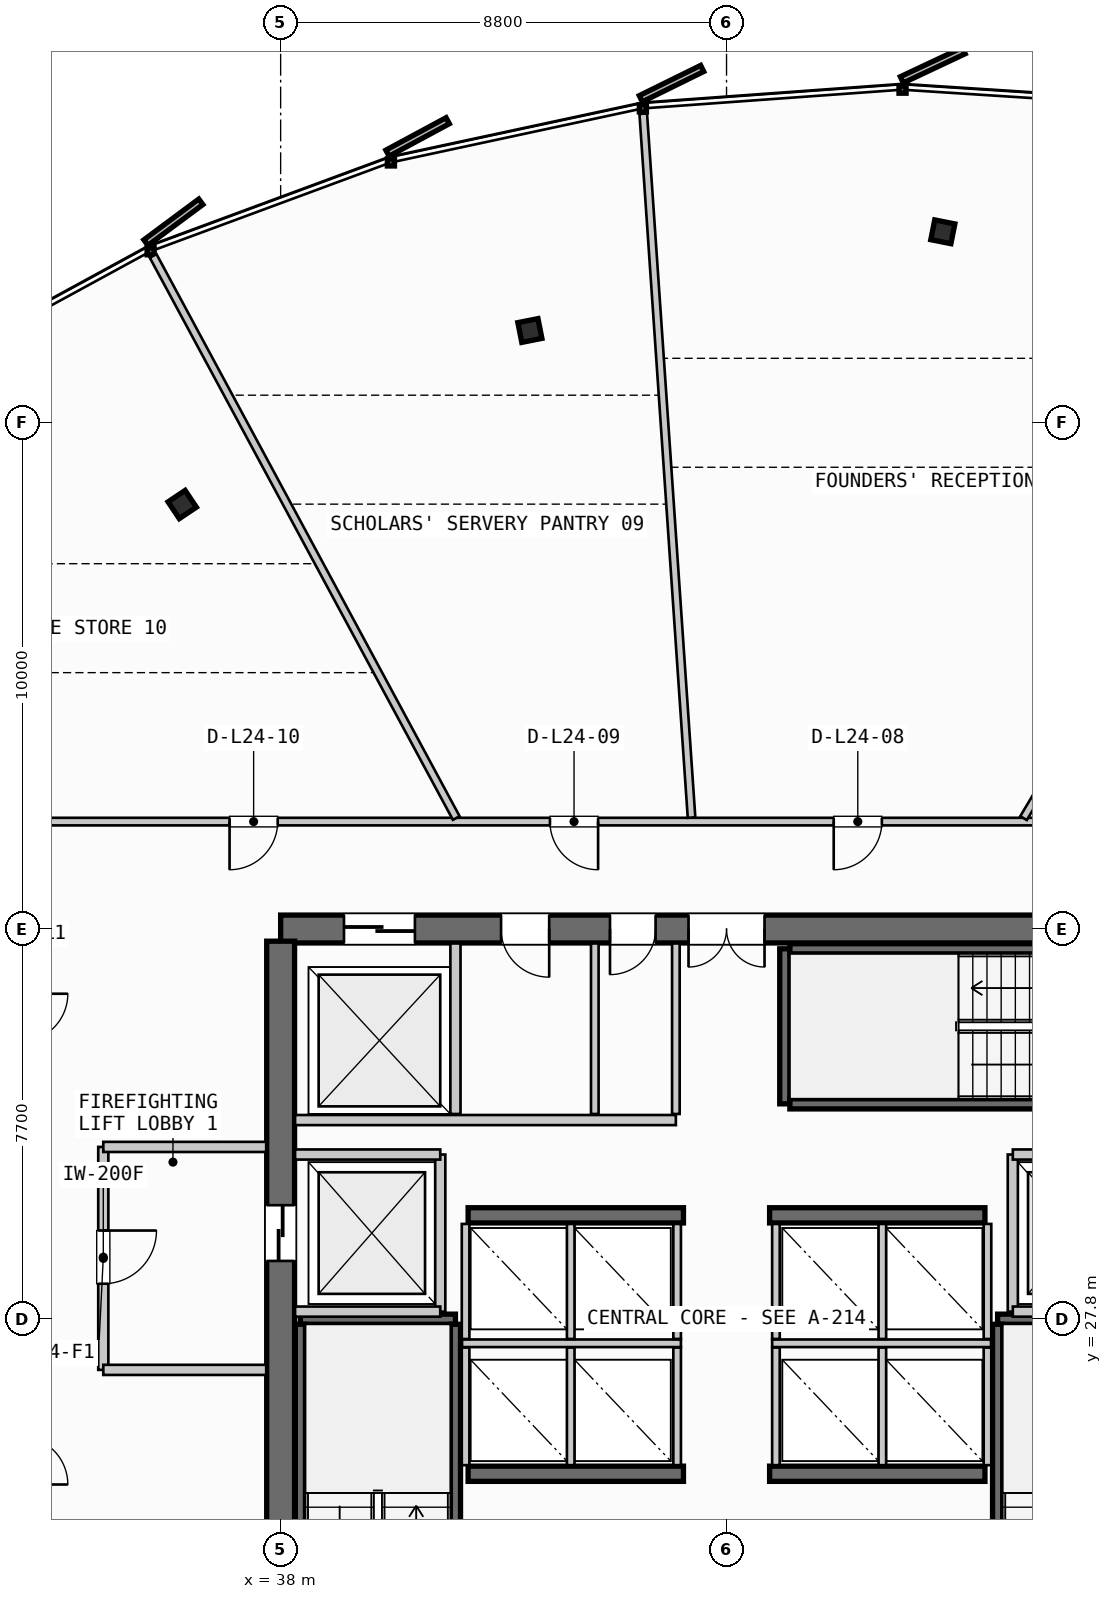
"""IFC4 building model, lengths in metres.
Left out: names, types, materials, properties, quantities, classifications, styles, units other than length and angle.
Written with IfcOpenShell. Run it as: python <this file> out.ifc"""

import sys

from ifc_helpers import new_model, si_unit, direction, frame, frame_2d, origin, origin_2d, place, context, subcontext, project, spatial, rectangle, i_section, extrude, source, transform, mapped, element, fill, save


model = new_model("IFC4")
c1 = context("Model", 3, precision=1e-05, world=origin(), true_north=direction((0.0, 1.0)))
c2 = subcontext(c1, "Body", "Model", "MODEL_VIEW")
j1 = project(units=[si_unit("LENGTHUNIT", "METRE"), si_unit("PLANEANGLEUNIT", "RADIAN")], contexts=[c1])
p1 = place(None, origin())
s1 = spatial("IfcSite", under=j1, at=p1, CompositionType="ELEMENT")
p2 = place(p1, origin())
s2 = spatial("IfcBuilding", under=s1, at=p2, CompositionType="ELEMENT")
p3 = place(p2, frame((0.0, 0.0, 100.0)))
s3 = spatial("IfcBuildingStorey", under=s2, at=p3, CompositionType="ELEMENT", Elevation=100.0)
p4 = place(p3, frame((55.6, 35.5, 0.0), z_axis=(0.0, 0.0, 1.0), x_axis=(-1.0, 0.0, 0.0)))
e1 = element("IfcWall", 1, at=p4, inside=s3, PredefinedType="SHEAR", context=c2, shape_type="SweptSolid", body=[
    extrude(rectangle(XDim=17.6, YDim=0.55, at=frame_2d((8.8, 0.0))), origin(), (0.0, 0.0, 1.0), 3.35),
])
p5 = place(p4, frame((8.05, 0.0, 0.0)))
e2 = element("IfcOpeningElement", 2, at=p5, cuts=e1, PredefinedType="OPENING", context=c2, shape_type="SweptSolid", body=[
    extrude(rectangle(XDim=1.5, YDim=2.2, at=frame_2d((0.75, 1.1))), frame((0.0, 0.285, 0.0), z_axis=(0.0, -1.0, 0.0), x_axis=(1.0, 0.0, 0.0)), (0.0, 0.0, 1.0), 0.57),
])
p6 = place(p4, frame((14.95, 0.0, 0.0)))
e3 = element("IfcOpeningElement", 3, at=p6, cuts=e1, PredefinedType="OPENING", context=c2, shape_type="SweptSolid", body=[
    extrude(rectangle(XDim=1.4, YDim=2.3, at=frame_2d((0.7, 1.15))), frame((0.0, 0.285, 0.0), z_axis=(0.0, -1.0, 0.0), x_axis=(1.0, 0.0, 0.0)), (0.0, 0.0, 1.0), 0.57),
])
p7 = place(p4, frame((12.3, 0.0, 0.0)))
e4 = element("IfcOpeningElement", 4, at=p7, cuts=e1, PredefinedType="OPENING", context=c2, shape_type="SweptSolid", body=[
    extrude(rectangle(XDim=0.95, YDim=2.15, at=frame_2d((0.475, 1.075))), frame((0.0, 0.285, 0.0), z_axis=(0.0, -1.0, 0.0), x_axis=(1.0, 0.0, 0.0)), (0.0, 0.0, 1.0), 0.57),
])
p8 = place(p4, frame((10.2, 0.0, 0.0)))
e5 = element("IfcOpeningElement", 5, at=p8, cuts=e1, PredefinedType="OPENING", context=c2, shape_type="SweptSolid", body=[
    extrude(rectangle(XDim=0.9, YDim=2.15, at=frame_2d((0.45, 1.075))), frame((0.0, 0.285, 0.0), z_axis=(0.0, -1.0, 0.0), x_axis=(1.0, 0.0, 0.0)), (0.0, 0.0, 1.0), 0.57),
])
p9 = place(p3, frame((38.0, 35.26, 0.0), z_axis=(0.0, 0.0, 1.0), x_axis=(0.0, -1.0, 0.0)))
e6 = element("IfcWall", 6, at=p9, inside=s3, PredefinedType="SHEAR", context=c2, shape_type="SweptSolid", body=[
    extrude(rectangle(XDim=14.92, YDim=0.55, at=frame_2d((7.46, 0.0))), origin(), (0.0, 0.0, 1.0), 3.35),
])
p10 = place(p9, frame((5.21, 0.0, 0.0)))
e7 = element("IfcOpeningElement", 7, at=p10, cuts=e6, PredefinedType="OPENING", context=c2, shape_type="SweptSolid", body=[
    extrude(rectangle(XDim=1.1, YDim=2.2, at=frame_2d((0.55, 1.1))), frame((0.0, 0.285, 0.0), z_axis=(0.0, -1.0, 0.0), x_axis=(1.0, 0.0, 0.0)), (0.0, 0.0, 1.0), 0.57),
])
for number, where, z_axis, x_axis in (
    (8, (41.7, 24.75, 0.0), (0.0, 0.0, 1.0), (1.0, 0.0, 0.0)),
    (9, (47.65, 24.75, 0.0), (0.0, 0.0, 1.0), (1.0, 0.0, 0.0)),
    (10, (41.7, 29.85, 0.0), (0.0, 0.0, 1.0), (1.0, 0.0, 0.0)),
    (11, (47.65, 29.85, 0.0), (0.0, 0.0, 1.0), (1.0, 0.0, 0.0)),
):
    element("IfcWall", number, at=place(p3, frame(where, z_axis=z_axis, x_axis=x_axis)), inside=s3, PredefinedType="SHEAR", context=c2, shape_type="SweptSolid", body=[
        extrude(rectangle(XDim=4.25, YDim=0.3, at=frame_2d((2.125, 0.0))), origin(), (0.0, 0.0, 1.0), 3.35),
    ])
m1 = source(origin(), c2, "Body", "SweptSolid", [
    extrude(i_section(OverallWidth=0.405, OverallDepth=0.398, WebThickness=0.035, FlangeThickness=0.056, FilletRadius=0.015, at=origin_2d()), origin(), (0.0, 0.0, 1.0), 3.35),
])
for number, where, z_axis, x_axis in (
    (12, (51.069, 49.259, 0.0), (0.0, 0.0, 1.0), (0.195, 0.981, 0.0)),
    (13, (42.919, 47.311, 0.0), (0.0, 0.0, 1.0), (-0.195, 0.981, 0.0)),
    (14, (36.058, 43.877, 0.0), (0.0, 0.0, 1.0), (-0.556, 0.831, 0.0)),
):
    element("IfcColumn", number, at=place(p3, frame(where, z_axis=z_axis, x_axis=x_axis)), inside=s3, PredefinedType="COLUMN", context=c2, shape_type="MappedRepresentation", body=[
        mapped(m1, transform((0.0, 0.0, 0.0), scale=1.0)),
    ])
p11 = place(p3, frame((38.39, 27.8, 0.0), z_axis=(0.0, 0.0, 1.0), x_axis=(1.0, 0.0, 0.0)))
e15 = element("IfcWall", 15, at=p11, inside=s3, PredefinedType="SHEAR", context=c2, shape_type="SweptSolid", body=[
    extrude(rectangle(XDim=3.06, YDim=0.2, at=frame_2d((1.53, 0.0))), origin(), (0.0, 0.0, 1.0), 3.35),
])
for number, where, z_axis, x_axis in (
    (16, (41.45, 27.7, 0.0), (0.0, 0.0, 1.0), (0.0, -1.0, 0.0)),
    (17, (38.39, 20.35, 0.0), (0.0, 0.0, 1.0), (0.0, 1.0, 0.0)),
):
    element("IfcWall", number, at=place(p3, frame(where, z_axis=z_axis, x_axis=x_axis)), inside=s3, PredefinedType="SHEAR", context=c2, shape_type="SweptSolid", body=[
        extrude(rectangle(XDim=7.35, YDim=0.2, at=frame_2d((3.675, 0.0))), origin(), (0.0, 0.0, 1.0), 3.35),
    ])
p12 = place(p3, frame((52.15, 27.8, 0.0), z_axis=(0.0, 0.0, 1.0), x_axis=(1.0, 0.0, 0.0)))
e18 = element("IfcWall", 18, at=p12, inside=s3, PredefinedType="SHEAR", context=c2, shape_type="SweptSolid", body=[
    extrude(rectangle(XDim=3.06, YDim=0.2, at=frame_2d((1.53, 0.0))), origin(), (0.0, 0.0, 1.0), 3.35),
])
p13 = place(p3, frame((52.15, 20.35, 0.0), z_axis=(0.0, 0.0, 1.0), x_axis=(0.0, 1.0, 0.0)))
e19 = element("IfcWall", 19, at=p13, inside=s3, PredefinedType="SHEAR", context=c2, shape_type="SweptSolid", body=[
    extrude(rectangle(XDim=7.35, YDim=0.2, at=frame_2d((3.675, 0.0))), origin(), (0.0, 0.0, 1.0), 3.35),
])
p14 = place(p3, frame((47.95, 32.05, 0.0), z_axis=(0.0, 0.0, 1.0), x_axis=(0.0, 1.0, 0.0)))
e20 = element("IfcWall", 20, at=p14, inside=s3, PredefinedType="SHEAR", context=c2, shape_type="SweptSolid", body=[
    extrude(rectangle(XDim=3.06, YDim=0.2, at=frame_2d((1.53, 0.0))), origin(), (0.0, 0.0, 1.0), 3.35),
])
for number, where, z_axis, x_axis in (
    (21, (48.05, 35.11, 0.0), (0.0, 0.0, 1.0), (1.0, 0.0, 0.0)),
    (22, (55.4, 32.05, 0.0), (0.0, 0.0, 1.0), (-1.0, 0.0, 0.0)),
):
    element("IfcWall", number, at=place(p3, frame(where, z_axis=z_axis, x_axis=x_axis)), inside=s3, PredefinedType="SHEAR", context=c2, shape_type="SweptSolid", body=[
        extrude(rectangle(XDim=7.35, YDim=0.2, at=frame_2d((3.675, 0.0))), origin(), (0.0, 0.0, 1.0), 3.35),
    ])
p15 = place(p3, frame((41.15, 27.95, 0.0), z_axis=(0.0, 0.0, 1.0), x_axis=(0.0, 1.0, 0.0)))
e23 = element("IfcWall", 23, at=p15, inside=s3, PredefinedType="PARTITIONING", context=c2, shape_type="SweptSolid", body=[
    extrude(rectangle(XDim=3.1, YDim=0.2, at=frame_2d((1.55, 0.0))), origin(), (0.0, 0.0, 1.0), 2.28),
])
for number, where, z_axis, x_axis in (
    (24, (38.285, 27.95, 0.0), (0.0, 0.0, 1.0), (1.0, 0.0, 0.0)),
    (25, (38.285, 31.05, 0.0), (0.0, 0.0, 1.0), (1.0, 0.0, 0.0)),
):
    element("IfcWall", number, at=place(p3, frame(where, z_axis=z_axis, x_axis=x_axis)), inside=s3, PredefinedType="PARTITIONING", context=c2, shape_type="SweptSolid", body=[
        extrude(rectangle(XDim=2.865, YDim=0.2, at=frame_2d((1.433, 0.0))), origin(), (0.0, 0.0, 1.0), 2.28),
    ])
p16 = place(p3, frame((34.5, 31.2, 0.0), z_axis=(0.0, 0.0, 1.0), x_axis=(0.0, -1.0, 0.0)))
e26 = element("IfcWall", 26, at=p16, inside=s3, PredefinedType="PARTITIONING", context=c2, shape_type="SweptSolid", body=[
    extrude(rectangle(XDim=4.4, YDim=0.2, at=frame_2d((2.2, 0.0))), origin(), (0.0, 0.0, 1.0), 2.28),
])
p17 = place(p16, frame((1.65, 0.0, 0.0)))
e27 = element("IfcOpeningElement", 27, at=p17, cuts=e26, PredefinedType="OPENING", context=c2, shape_type="SweptSolid", body=[
    extrude(rectangle(XDim=1.05, YDim=2.15, at=frame_2d((0.525, 1.075))), frame((0.0, 0.11, 0.0), z_axis=(0.0, -1.0, 0.0), x_axis=(1.0, 0.0, 0.0)), (0.0, 0.0, 1.0), 0.22),
])
for number, where, z_axis, x_axis in (
    (28, (34.5, 26.8, 0.0), (0.0, 0.0, 1.0), (1.0, 0.0, 0.0)),
    (29, (34.5, 31.2, 0.0), (0.0, 0.0, 1.0), (1.0, 0.0, 0.0)),
):
    element("IfcWall", number, at=place(p3, frame(where, z_axis=z_axis, x_axis=x_axis)), inside=s3, PredefinedType="PARTITIONING", context=c2, shape_type="SweptSolid", body=[
        extrude(rectangle(XDim=3.215, YDim=0.2, at=frame_2d((1.607, 0.0))), origin(), (0.0, 0.0, 1.0), 2.28),
    ])
p18 = place(p3, frame((52.45, 27.95, 0.0), z_axis=(0.0, 0.0, 1.0), x_axis=(0.0, 1.0, 0.0)))
e30 = element("IfcWall", 30, at=p18, inside=s3, PredefinedType="PARTITIONING", context=c2, shape_type="SweptSolid", body=[
    extrude(rectangle(XDim=3.1, YDim=0.2, at=frame_2d((1.55, 0.0))), origin(), (0.0, 0.0, 1.0), 2.28),
])
for number, where, z_axis, x_axis in (
    (31, (52.45, 27.95, 0.0), (0.0, 0.0, 1.0), (1.0, 0.0, 0.0)),
    (32, (52.45, 31.05, 0.0), (0.0, 0.0, 1.0), (1.0, 0.0, 0.0)),
):
    element("IfcWall", number, at=place(p3, frame(where, z_axis=z_axis, x_axis=x_axis)), inside=s3, PredefinedType="PARTITIONING", context=c2, shape_type="SweptSolid", body=[
        extrude(rectangle(XDim=2.865, YDim=0.2, at=frame_2d((1.433, 0.0))), origin(), (0.0, 0.0, 1.0), 2.28),
    ])
p19 = place(p3, frame((41.58, 27.325, 0.0), z_axis=(0.0, 0.0, 1.0), x_axis=(1.0, 0.0, 0.0)))
e33 = element("IfcWall", 33, at=p19, inside=s3, PredefinedType="PARTITIONING", context=c2, shape_type="SweptSolid", body=[
    extrude(rectangle(XDim=4.32, YDim=0.15, at=frame_2d((2.16, 0.0))), origin(), (0.0, 0.0, 1.0), 2.28),
])
p20 = place(p3, frame((47.7, 27.325, 0.0), z_axis=(0.0, 0.0, 1.0), x_axis=(1.0, 0.0, 0.0)))
e34 = element("IfcWall", 34, at=p20, inside=s3, PredefinedType="PARTITIONING", context=c2, shape_type="SweptSolid", body=[
    extrude(rectangle(XDim=4.32, YDim=0.15, at=frame_2d((2.16, 0.0))), origin(), (0.0, 0.0, 1.0), 2.28),
])
for number, where, z_axis, x_axis in (
    (35, (41.65, 24.92, 0.0), (0.0, 0.0, 1.0), (0.0, 1.0, 0.0)),
    (36, (43.725, 24.92, 0.0), (0.0, 0.0, 1.0), (0.0, 1.0, 0.0)),
    (37, (45.825, 24.92, 0.0), (0.0, 0.0, 1.0), (0.0, 1.0, 0.0)),
    (38, (47.775, 24.92, 0.0), (0.0, 0.0, 1.0), (0.0, 1.0, 0.0)),
    (39, (49.875, 24.92, 0.0), (0.0, 0.0, 1.0), (0.0, 1.0, 0.0)),
    (40, (51.95, 24.92, 0.0), (0.0, 0.0, 1.0), (0.0, 1.0, 0.0)),
):
    element("IfcWall", number, at=place(p3, frame(where, z_axis=z_axis, x_axis=x_axis)), inside=s3, PredefinedType="PARTITIONING", context=c2, shape_type="SweptSolid", body=[
        extrude(rectangle(XDim=2.32, YDim=0.15, at=frame_2d((1.16, 0.0))), origin(), (0.0, 0.0, 1.0), 2.28),
    ])
for number, where, z_axis, x_axis in (
    (41, (41.65, 27.41, 0.0), (0.0, 0.0, 1.0), (0.0, 1.0, 0.0)),
    (42, (43.725, 27.41, 0.0), (0.0, 0.0, 1.0), (0.0, 1.0, 0.0)),
    (43, (45.825, 27.41, 0.0), (0.0, 0.0, 1.0), (0.0, 1.0, 0.0)),
    (44, (47.775, 27.41, 0.0), (0.0, 0.0, 1.0), (0.0, 1.0, 0.0)),
    (45, (49.875, 27.41, 0.0), (0.0, 0.0, 1.0), (0.0, 1.0, 0.0)),
    (46, (51.95, 27.41, 0.0), (0.0, 0.0, 1.0), (0.0, 1.0, 0.0)),
):
    element("IfcWall", number, at=place(p3, frame(where, z_axis=z_axis, x_axis=x_axis)), inside=s3, PredefinedType="PARTITIONING", context=c2, shape_type="SweptSolid", body=[
        extrude(rectangle(XDim=2.27, YDim=0.15, at=frame_2d((1.135, 0.0))), origin(), (0.0, 0.0, 1.0), 2.28),
    ])
p21 = place(p3, frame((41.45, 31.85, 0.0), z_axis=(0.0, 0.0, 1.0), x_axis=(0.0, 1.0, 0.0)))
e47 = element("IfcWall", 47, at=p21, inside=s3, PredefinedType="PARTITIONING", context=c2, shape_type="SweptSolid", body=[
    extrude(rectangle(XDim=3.365, YDim=0.2, at=frame_2d((1.683, 0.0))), origin(), (0.0, 0.0, 1.0), 2.28),
])
p22 = place(p3, frame((38.285, 31.73, 0.0), z_axis=(0.0, 0.0, 1.0), x_axis=(1.0, 0.0, 0.0)))
e48 = element("IfcWall", 48, at=p22, inside=s3, PredefinedType="PARTITIONING", context=c2, shape_type="SweptSolid", body=[
    extrude(rectangle(XDim=7.515, YDim=0.2, at=frame_2d((3.758, 0.0))), origin(), (0.0, 0.0, 1.0), 2.28),
])
p23 = place(p3, frame((45.8, 31.85, 0.0), z_axis=(0.0, 0.0, 1.0), x_axis=(0.0, 1.0, 0.0)))
e49 = element("IfcWall", 49, at=p23, inside=s3, PredefinedType="PARTITIONING", context=c2, shape_type="SweptSolid", body=[
    extrude(rectangle(XDim=3.365, YDim=0.15, at=frame_2d((1.683, 0.0))), origin(), (0.0, 0.0, 1.0), 2.28),
])
p24 = place(p3, frame((44.2, 31.85, 0.0), z_axis=(0.0, 0.0, 1.0), x_axis=(0.0, 1.0, 0.0)))
e50 = element("IfcWall", 50, at=p24, inside=s3, PredefinedType="PLUMBINGWALL", context=c2, shape_type="SweptSolid", body=[
    extrude(rectangle(XDim=3.365, YDim=0.15, at=frame_2d((1.683, 0.0))), origin(), (0.0, 0.0, 1.0), 2.28),
])
p25 = place(p3, frame((61.27, 37.62, 0.0), z_axis=(0.0, 0.0, 1.0), x_axis=(-1.0, 0.0, 0.0)))
e51 = element("IfcWall", 51, at=p25, inside=s3, PredefinedType="PARTITIONING", context=c2, shape_type="SweptSolid", body=[
    extrude(rectangle(XDim=28.42, YDim=0.15, at=frame_2d((14.21, 0.0))), origin(), (0.0, 0.0, 1.0), 2.28),
])
p26 = place(p25, frame((4.139, 0.0, 0.0)))
e52 = element("IfcOpeningElement", 52, at=p26, cuts=e51, PredefinedType="OPENING", context=c2, shape_type="SweptSolid", body=[
    extrude(rectangle(XDim=0.95, YDim=2.15, at=frame_2d((0.475, 1.075))), frame((0.0, 0.085, 0.0), z_axis=(0.0, -1.0, 0.0), x_axis=(1.0, 0.0, 0.0)), (0.0, 0.0, 1.0), 0.17),
])
p27 = place(p25, frame((11.405, 0.0, 0.0)))
e53 = element("IfcOpeningElement", 53, at=p27, cuts=e51, PredefinedType="OPENING", context=c2, shape_type="SweptSolid", body=[
    extrude(rectangle(XDim=0.95, YDim=2.15, at=frame_2d((0.475, 1.075))), frame((0.0, 0.085, 0.0), z_axis=(0.0, -1.0, 0.0), x_axis=(1.0, 0.0, 0.0)), (0.0, 0.0, 1.0), 0.17),
])
p28 = place(p25, frame((17.005, 0.0, 0.0)))
e54 = element("IfcOpeningElement", 54, at=p28, cuts=e51, PredefinedType="OPENING", context=c2, shape_type="SweptSolid", body=[
    extrude(rectangle(XDim=0.95, YDim=2.15, at=frame_2d((0.475, 1.075))), frame((0.0, 0.085, 0.0), z_axis=(0.0, -1.0, 0.0), x_axis=(1.0, 0.0, 0.0)), (0.0, 0.0, 1.0), 0.17),
])
p29 = place(p25, frame((23.328, 0.0, 0.0)))
e55 = element("IfcOpeningElement", 55, at=p29, cuts=e51, PredefinedType="OPENING", context=c2, shape_type="SweptSolid", body=[
    extrude(rectangle(XDim=0.95, YDim=2.15, at=frame_2d((0.475, 1.075))), frame((0.0, 0.085, 0.0), z_axis=(0.0, -1.0, 0.0), x_axis=(1.0, 0.0, 0.0)), (0.0, 0.0, 1.0), 0.17),
])
p30 = place(p3, frame((52.662, 37.689, 0.0), z_axis=(0.0, 0.0, 1.0), x_axis=(0.512009752846, 0.858979634794, 0.0)))
e56 = element("IfcWall", 56, at=p30, inside=s3, PredefinedType="PARTITIONING", context=c2, shape_type="SweptSolid", body=[
    extrude(rectangle(XDim=15.047, YDim=0.15, at=frame_2d((7.524, 0.0))), origin(), (0.0, 0.0, 1.0), 2.28),
])
p31 = place(p3, frame((46.109, 37.7, 0.0), z_axis=(0.0, 0.0, 1.0), x_axis=(-0.068438008165, 0.997655370876, 0.0)))
e57 = element("IfcWall", 57, at=p31, inside=s3, PredefinedType="PARTITIONING", context=c2, shape_type="SweptSolid", body=[
    extrude(rectangle(XDim=13.923, YDim=0.15, at=frame_2d((6.962, 0.0))), origin(), (0.0, 0.0, 1.0), 2.28),
])
p32 = place(p3, frame((41.466, 37.69, 0.0), z_axis=(0.0, 0.0, 1.0), x_axis=(-0.474648473647, 0.880175452091, 0.0)))
e58 = element("IfcWall", 58, at=p32, inside=s3, PredefinedType="PARTITIONING", context=c2, shape_type="SweptSolid", body=[
    extrude(rectangle(XDim=12.602, YDim=0.15, at=frame_2d((6.301, 0.0))), origin(), (0.0, 0.0, 1.0), 2.28),
])
m2 = source(origin(), c2, "Body", "SweptSolid", [
    extrude(rectangle(XDim=1.5, YDim=2.2, at=frame_2d((0.75, 1.1))), frame((0.0, 0.025, 0.0), z_axis=(0.0, -1.0, 0.0), x_axis=(1.0, 0.0, 0.0)), (0.0, 0.0, 1.0), 0.05),
])
p33 = place(p5, origin())
e59 = element("IfcDoor", 59, at=p33, inside=s3, OperationType="DOUBLE_DOOR_SINGLE_SWING", PredefinedType="DOOR", context=c2, shape_type="MappedRepresentation", body=[
    mapped(m2, transform((0.0, 0.0, 0.0), scale=1.0)),
])
fill(e2, e59)
m3 = source(origin(), c2, "Body", "SweptSolid", [
    extrude(rectangle(XDim=1.1, YDim=2.2, at=frame_2d((0.55, 1.1))), frame((0.0, 0.025, 0.0), z_axis=(0.0, -1.0, 0.0), x_axis=(1.0, 0.0, 0.0)), (0.0, 0.0, 1.0), 0.05),
])
p34 = place(p10, origin())
e60 = element("IfcDoor", 60, at=p34, inside=s3, OperationType="SLIDING_TO_LEFT", PredefinedType="DOOR", context=c2, shape_type="MappedRepresentation", body=[
    mapped(m3, transform((0.0, 0.0, 0.0), scale=1.0)),
])
fill(e7, e60)
m4 = source(origin(), c2, "Body", "SweptSolid", [
    extrude(rectangle(XDim=1.4, YDim=2.3, at=frame_2d((0.7, 1.15))), frame((0.0, 0.025, 0.0), z_axis=(0.0, -1.0, 0.0), x_axis=(1.0, 0.0, 0.0)), (0.0, 0.0, 1.0), 0.05),
])
p35 = place(p6, origin())
e61 = element("IfcDoor", 61, at=p35, inside=s3, OperationType="SLIDING_TO_RIGHT", PredefinedType="DOOR", context=c2, shape_type="MappedRepresentation", body=[
    mapped(m4, transform((0.0, 0.0, 0.0), scale=1.0)),
])
fill(e3, e61)
m5 = source(origin(), c2, "Body", "SweptSolid", [
    extrude(rectangle(XDim=0.95, YDim=2.15, at=frame_2d((0.475, 1.075))), frame((0.0, 0.025, 0.0), z_axis=(0.0, -1.0, 0.0), x_axis=(1.0, 0.0, 0.0)), (0.0, 0.0, 1.0), 0.05),
])
p36 = place(p7, origin())
e62 = element("IfcDoor", 62, at=p36, inside=s3, OperationType="SINGLE_SWING_LEFT", PredefinedType="DOOR", context=c2, shape_type="MappedRepresentation", body=[
    mapped(m5, transform((0.0, 0.0, 0.0), scale=1.0)),
])
fill(e4, e62)
m6 = source(origin(), c2, "Body", "SweptSolid", [
    extrude(rectangle(XDim=0.9, YDim=2.15, at=frame_2d((0.45, 1.075))), frame((0.0, 0.025, 0.0), z_axis=(0.0, -1.0, 0.0), x_axis=(1.0, 0.0, 0.0)), (0.0, 0.0, 1.0), 0.05),
])
p37 = place(p8, origin())
e63 = element("IfcDoor", 63, at=p37, inside=s3, OperationType="SINGLE_SWING_RIGHT", PredefinedType="DOOR", context=c2, shape_type="MappedRepresentation", body=[
    mapped(m6, transform((0.0, 0.0, 0.0), scale=1.0)),
])
fill(e5, e63)
m7 = source(origin(), c2, "Body", "SweptSolid", [
    extrude(rectangle(XDim=1.05, YDim=2.15, at=frame_2d((0.525, 1.075))), frame((0.0, 0.025, 0.0), z_axis=(0.0, -1.0, 0.0), x_axis=(1.0, 0.0, 0.0)), (0.0, 0.0, 1.0), 0.05),
])
p38 = place(p17, origin())
e64 = element("IfcDoor", 64, at=p38, inside=s3, OperationType="SINGLE_SWING_LEFT", PredefinedType="DOOR", context=c2, shape_type="MappedRepresentation", body=[
    mapped(m7, transform((0.0, 0.0, 0.0), scale=1.0)),
])
fill(e27, e64)
p39 = place(p27, origin())
e65 = element("IfcDoor", 65, at=p39, inside=s3, OperationType="SINGLE_SWING_RIGHT", PredefinedType="DOOR", context=c2, shape_type="MappedRepresentation", body=[
    mapped(m5, transform((0.0, 0.0, 0.0), scale=1.0)),
])
fill(e53, e65)
p40 = place(p28, origin())
e66 = element("IfcDoor", 66, at=p40, inside=s3, OperationType="SINGLE_SWING_LEFT", PredefinedType="DOOR", context=c2, shape_type="MappedRepresentation", body=[
    mapped(m5, transform((0.0, 0.0, 0.0), scale=1.0)),
])
fill(e54, e66)
p41 = place(p29, origin())
e67 = element("IfcDoor", 67, at=p41, inside=s3, OperationType="SINGLE_SWING_RIGHT", PredefinedType="DOOR", context=c2, shape_type="MappedRepresentation", body=[
    mapped(m5, transform((0.0, 0.0, 0.0), scale=1.0)),
])
fill(e55, e67)
save(model, sys.argv[1])
